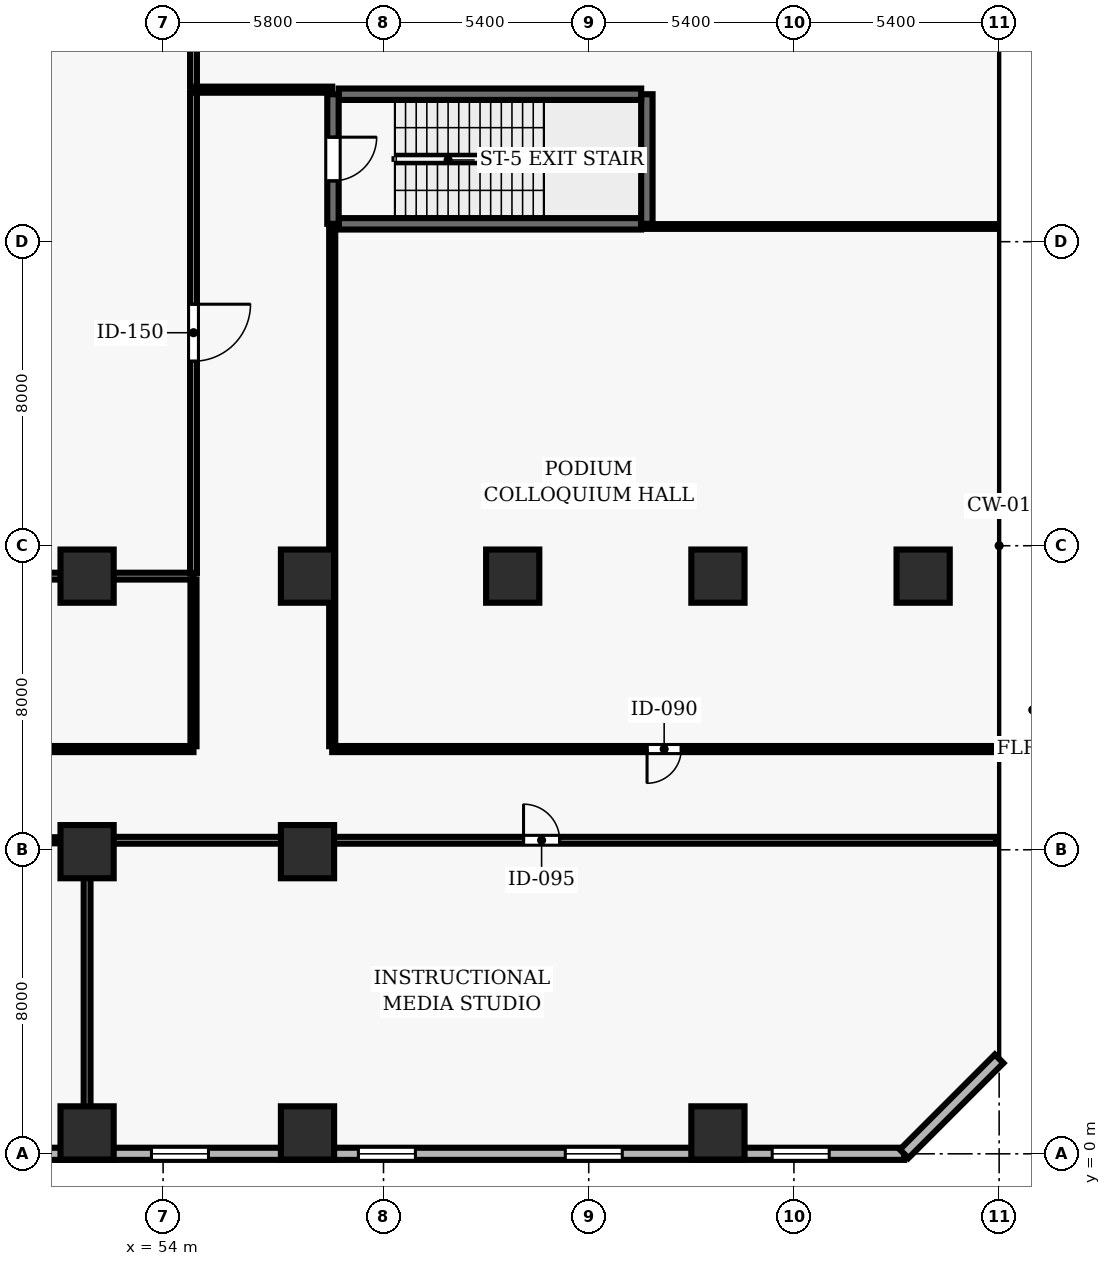
"""IFC4 building model, lengths in metres.
Left out: names, types, materials, properties, quantities, classifications, styles, units other than length and angle.
Written with IfcOpenShell. Run it as: python <this file> out.ifc"""

import sys

from ifc_helpers import new_model, si_unit, direction, frame, frame_2d, origin, origin_2d, place, context, subcontext, project, spatial, rectangle, extrude, element, fill, save


model = new_model("IFC4")
c1 = context("Model", 3, precision=1e-05, world=origin(), true_north=direction((0.0, 1.0)))
c2 = subcontext(c1, "Body", "Model", "MODEL_VIEW")
j1 = project(units=[si_unit("LENGTHUNIT", "METRE"), si_unit("PLANEANGLEUNIT", "RADIAN")], contexts=[c1])
p1 = place(None, origin())
s1 = spatial("IfcSite", under=j1, at=p1, CompositionType="ELEMENT")
p2 = place(p1, origin())
s2 = spatial("IfcBuilding", under=s1, at=p2, CompositionType="ELEMENT")
p3 = place(p2, frame((0.0, 0.0, 5.2)))
s3 = spatial("IfcBuildingStorey", under=s2, at=p3, CompositionType="ELEMENT", Elevation=5.2)
for number, where, z_axis, x_axis in (
    (1, (52.0, 0.55, 0.0), (0.0, 0.0, 1.0), (1.0, 0.0, 0.0)),
    (2, (52.0, 7.95, 0.0), (0.0, 0.0, 1.0), (1.0, 0.0, 0.0)),
    (3, (52.0, 15.2, 0.0), (0.0, 0.0, 1.0), (1.0, 0.0, 0.0)),
    (4, (57.8, 0.55, 0.0), (0.0, 0.0, 1.0), (1.0, 0.0, 0.0)),
    (5, (57.8, 7.95, 0.0), (0.0, 0.0, 1.0), (1.0, 0.0, 0.0)),
    (6, (57.8, 15.2, 0.0), (0.0, 0.0, 1.0), (1.0, 0.0, 0.0)),
    (7, (63.2, 15.2, 0.0), (0.0, 0.0, 1.0), (1.0, 0.0, 0.0)),
    (8, (68.6, 0.55, 0.0), (0.0, 0.0, 1.0), (1.0, 0.0, 0.0)),
    (9, (68.6, 15.2, 0.0), (0.0, 0.0, 1.0), (1.0, 0.0, 0.0)),
    (10, (74.0, 15.2, 0.0), (0.0, 0.0, 1.0), (1.0, 0.0, 0.0)),
):
    element("IfcColumn", number, at=place(p3, frame(where, z_axis=z_axis, x_axis=x_axis)), inside=s3, PredefinedType="COLUMN", context=c2, shape_type="SweptSolid", body=[
        extrude(rectangle(XDim=1.4, YDim=1.4, at=origin_2d()), origin(), (0.0, 0.0, 1.0), 5.2),
    ])
p4 = place(p3, frame((24.5, 0.0, 0.0), z_axis=(0.0, 0.0, 1.0), x_axis=(1.0, 0.0, 0.0)))
e11 = element("IfcWall", 11, at=p4, inside=s3, PredefinedType="SOLIDWALL", context=c2, shape_type="SweptSolid", body=[
    extrude(rectangle(XDim=49.0, YDim=0.32, at=frame_2d((24.5, 0.0))), origin(), (0.0, 0.0, 1.0), 4.92),
])
p5 = place(p4, frame((1.972, 0.0, 0.9)))
e12 = element("IfcOpeningElement", 12, at=p5, cuts=e11, PredefinedType="OPENING", context=c2, shape_type="SweptSolid", body=[
    extrude(rectangle(XDim=1.5, YDim=1.6, at=frame_2d((0.75, 0.8))), frame((0.0, 0.17, 0.0), z_axis=(0.0, -1.0, 0.0), x_axis=(1.0, 0.0, 0.0)), (0.0, 0.0, 1.0), 0.34),
])
p6 = place(p4, frame((8.317, 0.0, 0.9)))
e13 = element("IfcOpeningElement", 13, at=p6, cuts=e11, PredefinedType="OPENING", context=c2, shape_type="SweptSolid", body=[
    extrude(rectangle(XDim=1.5, YDim=1.6, at=frame_2d((0.75, 0.8))), frame((0.0, 0.17, 0.0), z_axis=(0.0, -1.0, 0.0), x_axis=(1.0, 0.0, 0.0)), (0.0, 0.0, 1.0), 0.34),
])
p7 = place(p4, frame((18.306, 0.0, 0.9)))
e14 = element("IfcOpeningElement", 14, at=p7, cuts=e11, PredefinedType="OPENING", context=c2, shape_type="SweptSolid", body=[
    extrude(rectangle(XDim=1.5, YDim=1.6, at=frame_2d((0.75, 0.8))), frame((0.0, 0.17, 0.0), z_axis=(0.0, -1.0, 0.0), x_axis=(1.0, 0.0, 0.0)), (0.0, 0.0, 1.0), 0.34),
])
p8 = place(p4, frame((23.75, 0.0, 0.9)))
e15 = element("IfcOpeningElement", 15, at=p8, cuts=e11, PredefinedType="OPENING", context=c2, shape_type="SweptSolid", body=[
    extrude(rectangle(XDim=1.5, YDim=1.6, at=frame_2d((0.75, 0.8))), frame((0.0, 0.17, 0.0), z_axis=(0.0, -1.0, 0.0), x_axis=(1.0, 0.0, 0.0)), (0.0, 0.0, 1.0), 0.34),
])
p9 = place(p4, frame((29.194, 0.0, 0.9)))
e16 = element("IfcOpeningElement", 16, at=p9, cuts=e11, PredefinedType="OPENING", context=c2, shape_type="SweptSolid", body=[
    extrude(rectangle(XDim=1.5, YDim=1.6, at=frame_2d((0.75, 0.8))), frame((0.0, 0.17, 0.0), z_axis=(0.0, -1.0, 0.0), x_axis=(1.0, 0.0, 0.0)), (0.0, 0.0, 1.0), 0.34),
])
p10 = place(p4, frame((34.639, 0.0, 0.9)))
e17 = element("IfcOpeningElement", 17, at=p10, cuts=e11, PredefinedType="OPENING", context=c2, shape_type="SweptSolid", body=[
    extrude(rectangle(XDim=1.5, YDim=1.6, at=frame_2d((0.75, 0.8))), frame((0.0, 0.17, 0.0), z_axis=(0.0, -1.0, 0.0), x_axis=(1.0, 0.0, 0.0)), (0.0, 0.0, 1.0), 0.34),
])
p11 = place(p4, frame((40.083, 0.0, 0.9)))
e18 = element("IfcOpeningElement", 18, at=p11, cuts=e11, PredefinedType="OPENING", context=c2, shape_type="SweptSolid", body=[
    extrude(rectangle(XDim=1.5, YDim=1.6, at=frame_2d((0.75, 0.8))), frame((0.0, 0.17, 0.0), z_axis=(0.0, -1.0, 0.0), x_axis=(1.0, 0.0, 0.0)), (0.0, 0.0, 1.0), 0.34),
])
p12 = place(p4, frame((45.528, 0.0, 0.9)))
e19 = element("IfcOpeningElement", 19, at=p12, cuts=e11, PredefinedType="OPENING", context=c2, shape_type="SweptSolid", body=[
    extrude(rectangle(XDim=1.5, YDim=1.6, at=frame_2d((0.75, 0.8))), frame((0.0, 0.17, 0.0), z_axis=(0.0, -1.0, 0.0), x_axis=(1.0, 0.0, 0.0)), (0.0, 0.0, 1.0), 0.34),
])
p13 = place(p3, frame((73.5, 0.0, 0.0), z_axis=(0.0, 0.0, 1.0), x_axis=(0.707106781187, 0.707106781187, 0.0)))
e20 = element("IfcWall", 20, at=p13, inside=s3, PredefinedType="SOLIDWALL", context=c2, shape_type="SweptSolid", body=[
    extrude(rectangle(XDim=3.536, YDim=0.32, at=frame_2d((1.768, 0.0))), origin(), (0.0, 0.0, 1.0), 4.92),
])
p14 = place(p3, frame((58.62, 24.47, 0.0), z_axis=(0.0, 0.0, 1.0), x_axis=(1.0, 0.0, 0.0)))
e21 = element("IfcWall", 21, at=p14, inside=s3, PredefinedType="SHEAR", context=c2, shape_type="SweptSolid", body=[
    extrude(rectangle(XDim=7.96, YDim=0.3, at=frame_2d((3.98, 0.0))), origin(), (0.0, 0.0, 1.0), 4.92),
])
p15 = place(p3, frame((66.73, 24.47, 0.0), z_axis=(0.0, 0.0, 1.0), x_axis=(0.0, 1.0, 0.0)))
e22 = element("IfcWall", 22, at=p15, inside=s3, PredefinedType="SHEAR", context=c2, shape_type="SweptSolid", body=[
    extrude(rectangle(XDim=3.41, YDim=0.3, at=frame_2d((1.705, 0.0))), origin(), (0.0, 0.0, 1.0), 4.92),
])
p16 = place(p3, frame((66.58, 27.88, 0.0), z_axis=(0.0, 0.0, 1.0), x_axis=(-1.0, 0.0, 0.0)))
e23 = element("IfcWall", 23, at=p16, inside=s3, PredefinedType="SHEAR", context=c2, shape_type="SweptSolid", body=[
    extrude(rectangle(XDim=7.96, YDim=0.3, at=frame_2d((3.98, 0.0))), origin(), (0.0, 0.0, 1.0), 4.92),
])
p17 = place(p3, frame((58.47, 27.88, 0.0), z_axis=(0.0, 0.0, 1.0), x_axis=(0.0, -1.0, 0.0)))
e24 = element("IfcWall", 24, at=p17, inside=s3, PredefinedType="SHEAR", context=c2, shape_type="SweptSolid", body=[
    extrude(rectangle(XDim=3.41, YDim=0.3, at=frame_2d((1.705, 0.0))), origin(), (0.0, 0.0, 1.0), 4.92),
])
p18 = place(p17, frame((1.13, 0.0, 0.0)))
e25 = element("IfcOpeningElement", 25, at=p18, cuts=e24, PredefinedType="OPENING", context=c2, shape_type="SweptSolid", body=[
    extrude(rectangle(XDim=1.15, YDim=2.15, at=frame_2d((0.575, 1.075))), frame((0.0, 0.16, 0.0), z_axis=(0.0, -1.0, 0.0), x_axis=(1.0, 0.0, 0.0)), (0.0, 0.0, 1.0), 0.32),
])
p19 = place(p3, frame((38.05, 8.25, 0.0), z_axis=(0.0, 0.0, 1.0), x_axis=(1.0, 0.0, 0.0)))
e26 = element("IfcWall", 26, at=p19, inside=s3, PredefinedType="PARTITIONING", context=c2, shape_type="SweptSolid", body=[
    extrude(rectangle(XDim=13.95, YDim=0.16, at=frame_2d((6.975, 0.0))), origin(), (0.0, 0.0, 1.0), 4.065),
])
p20 = place(p19, frame((4.725, 0.0, 0.0)))
e27 = element("IfcOpeningElement", 27, at=p20, cuts=e26, PredefinedType="OPENING", context=c2, shape_type="SweptSolid", body=[
    extrude(rectangle(XDim=1.0, YDim=2.1, at=frame_2d((0.5, 1.05))), frame((0.0, 0.09, 0.0), z_axis=(0.0, -1.0, 0.0), x_axis=(1.0, 0.0, 0.0)), (0.0, 0.0, 1.0), 0.18),
])
p21 = place(p3, frame((38.25, 15.2, 0.0), z_axis=(0.0, 0.0, 1.0), x_axis=(1.0, 0.0, 0.0)))
e28 = element("IfcWall", 28, at=p21, inside=s3, PredefinedType="PARTITIONING", context=c2, shape_type="SweptSolid", body=[
    extrude(rectangle(XDim=16.55, YDim=0.18, at=frame_2d((8.275, 0.0))), origin(), (0.0, 0.0, 1.0), 4.065),
])
p22 = place(p3, frame((52.0, 8.25, 0.0), z_axis=(0.0, 0.0, 1.0), x_axis=(1.0, 0.0, 0.0)))
e29 = element("IfcWall", 29, at=p22, inside=s3, PredefinedType="PARTITIONING", context=c2, shape_type="SweptSolid", body=[
    extrude(rectangle(XDim=23.92, YDim=0.18, at=frame_2d((11.96, 0.0))), origin(), (0.0, 0.0, 1.0), 4.065),
])
p23 = place(p22, frame((11.485, 0.0, 0.0)))
e30 = element("IfcOpeningElement", 30, at=p23, cuts=e29, PredefinedType="OPENING", context=c2, shape_type="SweptSolid", body=[
    extrude(rectangle(XDim=0.95, YDim=2.1, at=frame_2d((0.475, 1.05))), frame((0.0, 0.1, 0.0), z_axis=(0.0, -1.0, 0.0), x_axis=(1.0, 0.0, 0.0)), (0.0, 0.0, 1.0), 0.2),
])
p24 = place(p3, frame((54.8, 10.65, 0.0), z_axis=(0.0, 0.0, 1.0), x_axis=(-1.0, 0.0, 0.0)))
e31 = element("IfcWall", 31, at=p24, inside=s3, PredefinedType="PARTITIONING", context=c2, shape_type="SweptSolid", body=[
    extrude(rectangle(XDim=16.72, YDim=0.16, at=frame_2d((8.36, 0.0))), origin(), (0.0, 0.0, 1.0), 4.451),
])
p25 = place(p24, frame((7.91, 0.0, 0.0)))
e32 = element("IfcOpeningElement", 32, at=p25, cuts=e31, PredefinedType="OPENING", context=c2, shape_type="SweptSolid", body=[
    extrude(rectangle(XDim=0.9, YDim=2.1, at=frame_2d((0.45, 1.05))), frame((0.0, 0.09, 0.0), z_axis=(0.0, -1.0, 0.0), x_axis=(1.0, 0.0, 0.0)), (0.0, 0.0, 1.0), 0.18),
])
p26 = place(p3, frame((58.45, 28.0, 0.0), z_axis=(0.0, 0.0, 1.0), x_axis=(-1.0, 0.0, 0.0)))
e33 = element("IfcWall", 33, at=p26, inside=s3, PredefinedType="PARTITIONING", context=c2, shape_type="SweptSolid", body=[
    extrude(rectangle(XDim=3.65, YDim=0.16, at=frame_2d((1.825, 0.0))), origin(), (0.0, 0.0, 1.0), 4.92),
])
p27 = place(p3, frame((75.92, 10.65, 0.0), z_axis=(0.0, 0.0, 1.0), x_axis=(-1.0, 0.0, 0.0)))
e34 = element("IfcWall", 34, at=p27, inside=s3, PredefinedType="PARTITIONING", context=c2, shape_type="SweptSolid", body=[
    extrude(rectangle(XDim=17.47, YDim=0.16, at=frame_2d((8.735, 0.0))), origin(), (0.0, 0.0, 1.0), 4.451),
])
p28 = place(p27, frame((8.285, 0.0, 0.0)))
e35 = element("IfcOpeningElement", 35, at=p28, cuts=e34, PredefinedType="OPENING", context=c2, shape_type="SweptSolid", body=[
    extrude(rectangle(XDim=0.9, YDim=2.1, at=frame_2d((0.45, 1.05))), frame((0.0, 0.09, 0.0), z_axis=(0.0, -1.0, 0.0), x_axis=(1.0, 0.0, 0.0)), (0.0, 0.0, 1.0), 0.18),
])
p29 = place(p3, frame((75.92, 24.4, 0.0), z_axis=(0.0, 0.0, 1.0), x_axis=(-1.0, 0.0, 0.0)))
e36 = element("IfcWall", 36, at=p29, inside=s3, PredefinedType="PARTITIONING", context=c2, shape_type="SweptSolid", body=[
    extrude(rectangle(XDim=9.34, YDim=0.125, at=frame_2d((4.67, 0.0))), origin(), (0.0, 0.0, 1.0), 4.92),
])
p30 = place(p3, frame((52.0, 0.155, 0.0), z_axis=(0.0, 0.0, 1.0), x_axis=(0.0, 1.0, 0.0)))
e37 = element("IfcWall", 37, at=p30, inside=s3, PredefinedType="PARTITIONING", context=c2, shape_type="SweptSolid", body=[
    extrude(rectangle(XDim=8.01, YDim=0.18, at=frame_2d((4.005, 0.0))), origin(), (0.0, 0.0, 1.0), 4.065),
])
p31 = place(p3, frame((54.8, 15.115, 0.0), z_axis=(0.0, 0.0, 1.0), x_axis=(0.0, -1.0, 0.0)))
e38 = element("IfcWall", 38, at=p31, inside=s3, PredefinedType="PARTITIONING", context=c2, shape_type="SweptSolid", body=[
    extrude(rectangle(XDim=4.39, YDim=0.16, at=frame_2d((2.195, 0.0))), origin(), (0.0, 0.0, 1.0), 4.92),
])
p32 = place(p3, frame((54.8, 28.075, 0.0), z_axis=(0.0, 0.0, 1.0), x_axis=(0.0, 1.0, 0.0)))
e39 = element("IfcWall", 39, at=p32, inside=s3, PredefinedType="PARTITIONING", context=c2, shape_type="SweptSolid", body=[
    extrude(rectangle(XDim=3.835, YDim=0.18, at=frame_2d((1.917, 0.0))), origin(), (0.0, 0.0, 1.0), 4.451),
])
p33 = place(p3, frame((54.8, 27.925, 0.0), z_axis=(0.0, 0.0, 1.0), x_axis=(0.0, -1.0, 0.0)))
e40 = element("IfcWall", 40, at=p33, inside=s3, PredefinedType="PARTITIONING", context=c2, shape_type="SweptSolid", body=[
    extrude(rectangle(XDim=12.64, YDim=0.18, at=frame_2d((6.32, 0.0))), origin(), (0.0, 0.0, 1.0), 4.451),
])
p34 = place(p33, frame((5.57, 0.0, 0.0)))
e41 = element("IfcOpeningElement", 41, at=p34, cuts=e40, PredefinedType="OPENING", context=c2, shape_type="SweptSolid", body=[
    extrude(rectangle(XDim=1.5, YDim=2.2, at=frame_2d((0.75, 1.1))), frame((0.0, 0.1, 0.0), z_axis=(0.0, -1.0, 0.0), x_axis=(1.0, 0.0, 0.0)), (0.0, 0.0, 1.0), 0.2),
])
p35 = place(p3, frame((58.45, 10.725, 0.0), z_axis=(0.0, 0.0, 1.0), x_axis=(0.0, 1.0, 0.0)))
e42 = element("IfcWall", 42, at=p35, inside=s3, PredefinedType="PARTITIONING", context=c2, shape_type="SweptSolid", body=[
    extrude(rectangle(XDim=13.675, YDim=0.16, at=frame_2d((6.837, 0.0))), origin(), (0.0, 0.0, 1.0), 4.92),
])
p36 = place(p9, origin())
e43 = element("IfcWindow", 43, at=p36, inside=s3, PartitioningType="SINGLE_PANEL", PredefinedType="WINDOW", context=c2, shape_type="SweptSolid", body=[
    extrude(rectangle(XDim=1.5, YDim=1.6, at=frame_2d((0.75, 0.8))), frame((0.0, 0.03, 0.0), z_axis=(0.0, -1.0, 0.0), x_axis=(1.0, 0.0, 0.0)), (0.0, 0.0, 1.0), 0.06),
])
fill(e16, e43)
p37 = place(p10, origin())
e44 = element("IfcWindow", 44, at=p37, inside=s3, PartitioningType="SINGLE_PANEL", PredefinedType="WINDOW", context=c2, shape_type="SweptSolid", body=[
    extrude(rectangle(XDim=1.5, YDim=1.6, at=frame_2d((0.75, 0.8))), frame((0.0, 0.03, 0.0), z_axis=(0.0, -1.0, 0.0), x_axis=(1.0, 0.0, 0.0)), (0.0, 0.0, 1.0), 0.06),
])
fill(e17, e44)
p38 = place(p11, origin())
e45 = element("IfcWindow", 45, at=p38, inside=s3, PartitioningType="SINGLE_PANEL", PredefinedType="WINDOW", context=c2, shape_type="SweptSolid", body=[
    extrude(rectangle(XDim=1.5, YDim=1.6, at=frame_2d((0.75, 0.8))), frame((0.0, 0.03, 0.0), z_axis=(0.0, -1.0, 0.0), x_axis=(1.0, 0.0, 0.0)), (0.0, 0.0, 1.0), 0.06),
])
fill(e18, e45)
p39 = place(p12, origin())
e46 = element("IfcWindow", 46, at=p39, inside=s3, PartitioningType="SINGLE_PANEL", PredefinedType="WINDOW", context=c2, shape_type="SweptSolid", body=[
    extrude(rectangle(XDim=1.5, YDim=1.6, at=frame_2d((0.75, 0.8))), frame((0.0, 0.03, 0.0), z_axis=(0.0, -1.0, 0.0), x_axis=(1.0, 0.0, 0.0)), (0.0, 0.0, 1.0), 0.06),
])
fill(e19, e46)
p40 = place(p18, origin())
e47 = element("IfcDoor", 47, at=p40, inside=s3, OperationType="SINGLE_SWING_LEFT", PredefinedType="DOOR", context=c2, shape_type="SweptSolid", body=[
    extrude(rectangle(XDim=1.15, YDim=2.15, at=frame_2d((0.575, 1.075))), frame((0.0, 0.025, 0.0), z_axis=(0.0, -1.0, 0.0), x_axis=(1.0, 0.0, 0.0)), (0.0, 0.0, 1.0), 0.05),
])
fill(e25, e47)
p41 = place(p34, origin())
e48 = element("IfcDoor", 48, at=p41, inside=s3, OperationType="SINGLE_SWING_LEFT", PredefinedType="DOOR", context=c2, shape_type="SweptSolid", body=[
    extrude(rectangle(XDim=1.5, YDim=2.2, at=frame_2d((0.75, 1.1))), frame((0.0, 0.025, 0.0), z_axis=(0.0, -1.0, 0.0), x_axis=(1.0, 0.0, 0.0)), (0.0, 0.0, 1.0), 0.05),
])
fill(e41, e48)
p42 = place(p28, origin())
e49 = element("IfcDoor", 49, at=p42, inside=s3, OperationType="SINGLE_SWING_RIGHT", PredefinedType="DOOR", context=c2, shape_type="SweptSolid", body=[
    extrude(rectangle(XDim=0.9, YDim=2.1, at=frame_2d((0.45, 1.05))), frame((0.0, 0.025, 0.0), z_axis=(0.0, -1.0, 0.0), x_axis=(1.0, 0.0, 0.0)), (0.0, 0.0, 1.0), 0.05),
])
fill(e35, e49)
p43 = place(p23, origin())
e50 = element("IfcDoor", 50, at=p43, inside=s3, OperationType="SINGLE_SWING_LEFT", PredefinedType="DOOR", context=c2, shape_type="SweptSolid", body=[
    extrude(rectangle(XDim=0.95, YDim=2.1, at=frame_2d((0.475, 1.05))), frame((0.0, 0.025, 0.0), z_axis=(0.0, -1.0, 0.0), x_axis=(1.0, 0.0, 0.0)), (0.0, 0.0, 1.0), 0.05),
])
fill(e30, e50)
save(model, sys.argv[1])
